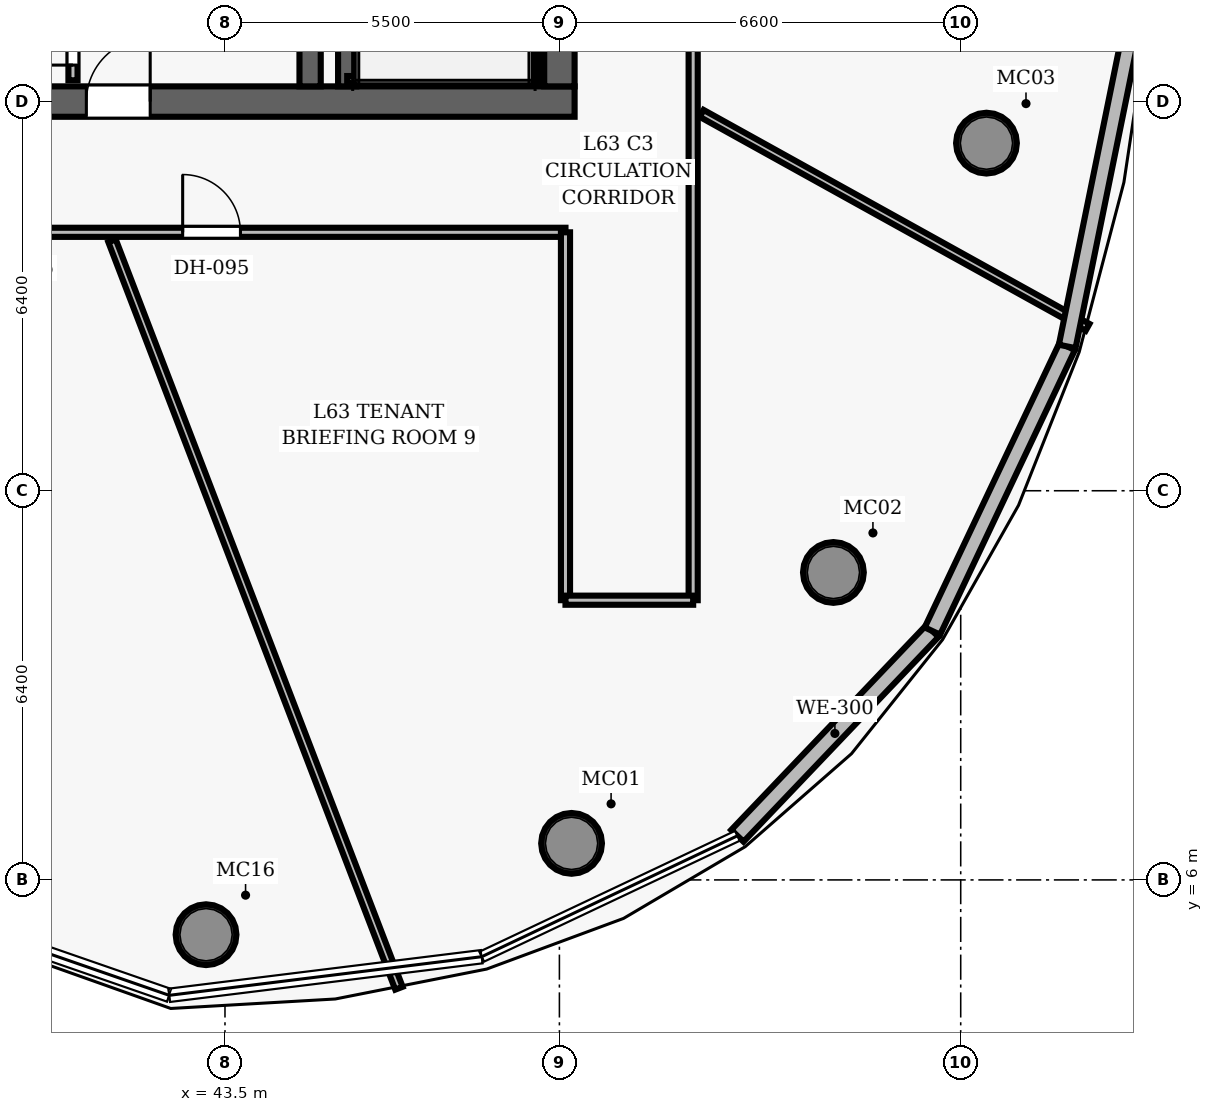
"""IFC4 building model, lengths in metres.
Left out: names, types, materials, properties, quantities, classifications, styles, units other than length and angle.
Written with IfcOpenShell. Run it as: python <this file> out.ifc"""

import sys

from ifc_helpers import new_model, si_unit, direction, frame, frame_2d, origin, origin_2d, place, context, subcontext, project, spatial, rectangle, hollow_circle, extrude, element, fill, save


model = new_model("IFC4")
c1 = context("Model", 3, precision=1e-05, world=origin(), true_north=direction((0.0, 1.0)))
c2 = subcontext(c1, "Body", "Model", "MODEL_VIEW")
j1 = project(units=[si_unit("LENGTHUNIT", "METRE"), si_unit("PLANEANGLEUNIT", "RADIAN")], contexts=[c1])
p1 = place(None, origin())
s1 = spatial("IfcSite", under=j1, at=p1, CompositionType="ELEMENT")
p2 = place(p1, origin())
s2 = spatial("IfcBuilding", under=s1, at=p2, CompositionType="ELEMENT")
p3 = place(p2, frame((0.0, 0.0, 249.75)))
s3 = spatial("IfcBuildingStorey", under=s2, at=p3, CompositionType="ELEMENT", Elevation=249.75)
p4 = place(p3, frame((26.75, 18.8, 0.0), z_axis=(0.0, 0.0, 1.0), x_axis=(1.0, 0.0, 0.0)))
e1 = element("IfcWall", 1, at=p4, inside=s3, PredefinedType="SHEAR", context=c2, shape_type="SweptSolid", body=[
    extrude(rectangle(XDim=22.5, YDim=0.5, at=frame_2d((11.25, 0.0))), origin(), (0.0, 0.0, 1.0), 3.85),
])
p5 = place(p4, frame((14.47, 0.0, 0.0)))
e2 = element("IfcOpeningElement", 2, at=p5, cuts=e1, PredefinedType="OPENING", context=c2, shape_type="SweptSolid", body=[
    extrude(rectangle(XDim=1.05, YDim=2.15, at=frame_2d((0.525, 1.075))), frame((0.0, 0.26, 0.0), z_axis=(0.0, -1.0, 0.0), x_axis=(1.0, 0.0, 0.0)), (0.0, 0.0, 1.0), 0.52),
])
p6 = place(p3, frame((49.0, 19.05, 0.0), z_axis=(0.0, 0.0, 1.0), x_axis=(0.0, 1.0, 0.0)))
e3 = element("IfcWall", 3, at=p6, inside=s3, PredefinedType="SHEAR", context=c2, shape_type="SweptSolid", body=[
    extrude(rectangle(XDim=13.9, YDim=0.5, at=frame_2d((6.95, 0.0))), origin(), (0.0, 0.0, 1.0), 3.85),
])
p7 = place(p6, frame((8.2, 0.0, 0.0)))
e4 = element("IfcOpeningElement", 4, at=p7, cuts=e3, PredefinedType="OPENING", context=c2, shape_type="SweptSolid", body=[
    extrude(rectangle(XDim=1.05, YDim=2.15, at=frame_2d((0.525, 1.075))), frame((0.0, 0.26, 0.0), z_axis=(0.0, -1.0, 0.0), x_axis=(1.0, 0.0, 0.0)), (0.0, 0.0, 1.0), 0.52),
])
p8 = place(p3, frame((44.9, 19.05, 0.0), z_axis=(0.0, 0.0, 1.0), x_axis=(0.0, 1.0, 0.0)))
e5 = element("IfcWall", 5, at=p8, inside=s3, PredefinedType="SHEAR", context=c2, shape_type="SweptSolid", body=[
    extrude(rectangle(XDim=13.9, YDim=0.35, at=frame_2d((6.95, 0.0))), origin(), (0.0, 0.0, 1.0), 3.85),
])
for number, where, z_axis, x_axis in (
    (6, (49.2, 6.601, 0.0), (0.0, 0.0, 1.0), (1.0, 0.0, 0.0)),
    (7, (53.506, 11.056, 0.0), (0.0, 0.0, 1.0), (1.0, 0.0, 0.0)),
    (8, (56.024, 18.116, 0.0), (0.0, 0.0, 1.0), (1.0, 0.0, 0.0)),
    (9, (43.188, 5.099, 0.0), (0.0, 0.0, 1.0), (1.0, 0.0, 0.0)),
):
    element("IfcColumn", number, at=place(p3, frame(where, z_axis=z_axis, x_axis=x_axis)), inside=s3, PredefinedType="COLUMN", context=c2, shape_type="SweptSolid", body=[
        extrude(hollow_circle(Radius=0.5, WallThickness=0.045, at=origin_2d()), origin(), (0.0, 0.0, 1.0), 3.85),
    ])
p9 = place(p3, frame((45.51, 19.05, 0.0), z_axis=(0.0, 0.0, 1.0), x_axis=(0.0, 1.0, 0.0)))
e10 = element("IfcWall", 10, at=p9, inside=s3, PredefinedType="SHEAR", context=c2, shape_type="SweptSolid", body=[
    extrude(rectangle(XDim=7.5, YDim=0.3, at=frame_2d((3.75, 0.0))), origin(), (0.0, 0.0, 1.0), 3.85),
])
p10 = place(p3, frame((48.605, 19.1, 0.0), z_axis=(0.0, 0.0, 1.0), x_axis=(0.0, 1.0, 0.0)))
e11 = element("IfcWall", 11, at=p10, inside=s3, PredefinedType="SHEAR", context=c2, shape_type="SweptSolid", body=[
    extrude(rectangle(XDim=7.45, YDim=0.12, at=frame_2d((3.725, 0.0))), origin(), (0.0, 0.0, 1.0), 3.85),
])
p11 = place(p3, frame((45.51, 19.16, 0.0), z_axis=(0.0, 0.0, 1.0), x_axis=(1.0, 0.0, 0.0)))
e12 = element("IfcWall", 12, at=p11, inside=s3, PredefinedType="SHEAR", context=c2, shape_type="SweptSolid", body=[
    extrude(rectangle(XDim=3.095, YDim=0.12, at=frame_2d((1.547, 0.0))), origin(), (0.0, 0.0, 1.0), 3.85),
])
p12 = place(p3, frame((41.0, 19.15, 0.0), z_axis=(0.0, 0.0, 1.0), x_axis=(0.0, 1.0, 0.0)))
e13 = element("IfcWall", 13, at=p12, inside=s3, PredefinedType="PARTITIONING", context=c2, shape_type="SweptSolid", body=[
    extrude(rectangle(XDim=7.95, YDim=0.15, at=frame_2d((3.975, 0.0))), origin(), (0.0, 0.0, 1.0), 3.04),
])
p13 = place(p12, frame((0.25, 0.0, 0.0)))
e14 = element("IfcOpeningElement", 14, at=p13, cuts=e13, PredefinedType="OPENING", context=c2, shape_type="SweptSolid", body=[
    extrude(rectangle(XDim=0.85, YDim=2.1, at=frame_2d((0.425, 1.05))), frame((0.0, 0.085, 0.0), z_axis=(0.0, -1.0, 0.0), x_axis=(1.0, 0.0, 0.0)), (0.0, 0.0, 1.0), 0.17),
])
p14 = place(p12, frame((2.953, 0.0, 0.0)))
e15 = element("IfcOpeningElement", 15, at=p14, cuts=e13, PredefinedType="OPENING", context=c2, shape_type="SweptSolid", body=[
    extrude(rectangle(XDim=0.85, YDim=2.1, at=frame_2d((0.425, 1.05))), frame((0.0, 0.085, 0.0), z_axis=(0.0, -1.0, 0.0), x_axis=(1.0, 0.0, 0.0)), (0.0, 0.0, 1.0), 0.17),
])
p15 = place(p12, frame((5.576, 0.0, 0.0)))
e16 = element("IfcOpeningElement", 16, at=p15, cuts=e13, PredefinedType="OPENING", context=c2, shape_type="SweptSolid", body=[
    extrude(rectangle(XDim=0.85, YDim=2.1, at=frame_2d((0.425, 1.05))), frame((0.0, 0.085, 0.0), z_axis=(0.0, -1.0, 0.0), x_axis=(1.0, 0.0, 0.0)), (0.0, 0.0, 1.0), 0.17),
])
p16 = place(p3, frame((26.9, 16.65, 0.0), z_axis=(0.0, 0.0, 1.0), x_axis=(1.0, 0.0, 0.0)))
e17 = element("IfcWall", 17, at=p16, inside=s3, PredefinedType="PARTITIONING", context=c2, shape_type="SweptSolid", body=[
    extrude(rectangle(XDim=22.2, YDim=0.15, at=frame_2d((11.1, 0.0))), origin(), (0.0, 0.0, 1.0), 3.04),
])
p17 = place(p16, frame((5.627, 0.0, 0.0)))
e18 = element("IfcOpeningElement", 18, at=p17, cuts=e17, PredefinedType="OPENING", context=c2, shape_type="SweptSolid", body=[
    extrude(rectangle(XDim=0.95, YDim=2.15, at=frame_2d((0.475, 1.075))), frame((0.0, 0.085, 0.0), z_axis=(0.0, -1.0, 0.0), x_axis=(1.0, 0.0, 0.0)), (0.0, 0.0, 1.0), 0.17),
])
p18 = place(p16, frame((12.684, 0.0, 0.0)))
e19 = element("IfcOpeningElement", 19, at=p18, cuts=e17, PredefinedType="OPENING", context=c2, shape_type="SweptSolid", body=[
    extrude(rectangle(XDim=0.95, YDim=2.15, at=frame_2d((0.475, 1.075))), frame((0.0, 0.085, 0.0), z_axis=(0.0, -1.0, 0.0), x_axis=(1.0, 0.0, 0.0)), (0.0, 0.0, 1.0), 0.17),
])
p19 = place(p16, frame((15.904, 0.0, 0.0)))
e20 = element("IfcOpeningElement", 20, at=p19, cuts=e17, PredefinedType="OPENING", context=c2, shape_type="SweptSolid", body=[
    extrude(rectangle(XDim=0.95, YDim=2.15, at=frame_2d((0.475, 1.075))), frame((0.0, 0.085, 0.0), z_axis=(0.0, -1.0, 0.0), x_axis=(1.0, 0.0, 0.0)), (0.0, 0.0, 1.0), 0.17),
])
p20 = place(p3, frame((51.2, 10.6, 0.0), z_axis=(0.0, 0.0, 1.0), x_axis=(0.0, 1.0, 0.0)))
e21 = element("IfcWall", 21, at=p20, inside=s3, PredefinedType="PARTITIONING", context=c2, shape_type="SweptSolid", body=[
    extrude(rectangle(XDim=30.8, YDim=0.15, at=frame_2d((15.4, 0.0))), origin(), (0.0, 0.0, 1.0), 3.04),
])
p21 = place(p20, frame((20.494, 0.0, 0.0)))
e22 = element("IfcOpeningElement", 22, at=p21, cuts=e21, PredefinedType="OPENING", context=c2, shape_type="SweptSolid", body=[
    extrude(rectangle(XDim=0.95, YDim=2.15, at=frame_2d((0.475, 1.075))), frame((0.0, 0.085, 0.0), z_axis=(0.0, -1.0, 0.0), x_axis=(1.0, 0.0, 0.0)), (0.0, 0.0, 1.0), 0.17),
])
p22 = place(p20, frame((10.941, 0.0, 0.0)))
e23 = element("IfcOpeningElement", 23, at=p22, cuts=e21, PredefinedType="OPENING", context=c2, shape_type="SweptSolid", body=[
    extrude(rectangle(XDim=0.95, YDim=2.15, at=frame_2d((0.475, 1.075))), frame((0.0, 0.085, 0.0), z_axis=(0.0, -1.0, 0.0), x_axis=(1.0, 0.0, 0.0)), (0.0, 0.0, 1.0), 0.17),
])
p23 = place(p3, frame((49.1, 10.6, 0.0), z_axis=(0.0, 0.0, 1.0), x_axis=(0.0, 1.0, 0.0)))
e24 = element("IfcWall", 24, at=p23, inside=s3, PredefinedType="PARTITIONING", context=c2, shape_type="SweptSolid", body=[
    extrude(rectangle(XDim=6.05, YDim=0.15, at=frame_2d((3.025, 0.0))), origin(), (0.0, 0.0, 1.0), 3.04),
])
p24 = place(p3, frame((49.1, 10.6, 0.0), z_axis=(0.0, 0.0, 1.0), x_axis=(1.0, 0.0, 0.0)))
e25 = element("IfcWall", 25, at=p24, inside=s3, PredefinedType="PARTITIONING", context=c2, shape_type="SweptSolid", body=[
    extrude(rectangle(XDim=2.1, YDim=0.15, at=frame_2d((1.05, 0.0))), origin(), (0.0, 0.0, 1.0), 3.04),
])
p25 = place(p3, frame((41.643, 16.51, 0.0), z_axis=(0.0, 0.0, 1.0), x_axis=(0.358373851229, -0.933578161032, 0.0)))
e26 = element("IfcWall", 26, at=p25, inside=s3, PredefinedType="PARTITIONING", context=c2, shape_type="SweptSolid", body=[
    extrude(rectangle(XDim=13.166, YDim=0.13, at=frame_2d((6.583, 0.0))), origin(), (0.0, 0.0, 1.0), 3.04),
])
p26 = place(p3, frame((51.34, 18.605, 0.0), z_axis=(0.0, 0.0, 1.0), x_axis=(0.87461556229, -0.484817097678, 0.0)))
e27 = element("IfcWall", 27, at=p26, inside=s3, PredefinedType="PARTITIONING", context=c2, shape_type="SweptSolid", body=[
    extrude(rectangle(XDim=7.256, YDim=0.13, at=frame_2d((3.628, 0.0))), origin(), (0.0, 0.0, 1.0), 3.04),
])
p27 = place(p3, frame((55.135, 10.093, 0.0), z_axis=(0.0, 0.0, 1.0), x_axis=(-0.68967876669, -0.724115459562, 0.0)))
e28 = element("IfcWall", 28, at=p27, inside=s3, PredefinedType="SOLIDWALL", context=c2, shape_type="SweptSolid", body=[
    extrude(rectangle(XDim=4.651, YDim=0.28, at=frame_2d((2.325, 0.0))), origin(), (0.0, 0.0, 1.0), 3.625),
])
p28 = place(p3, frame((57.352, 14.773, 0.0), z_axis=(0.0, 0.0, 1.0), x_axis=(-0.428068107667, -0.903746477281, 0.0)))
e29 = element("IfcWall", 29, at=p28, inside=s3, PredefinedType="SOLIDWALL", context=c2, shape_type="SweptSolid", body=[
    extrude(rectangle(XDim=5.179, YDim=0.28, at=frame_2d((2.59, 0.0))), origin(), (0.0, 0.0, 1.0), 3.625),
])
p29 = place(p3, frame((58.521, 20.516, 0.0), z_axis=(0.0, 0.0, 1.0), x_axis=(-0.199480028062, -0.979901892234, 0.0)))
e30 = element("IfcWall", 30, at=p29, inside=s3, PredefinedType="SOLIDWALL", context=c2, shape_type="SweptSolid", body=[
    extrude(rectangle(XDim=5.86, YDim=0.28, at=frame_2d((2.93, 0.0))), origin(), (0.0, 0.0, 1.0), 3.625),
])
p30 = place(p5, origin())
e31 = element("IfcDoor", 31, at=p30, inside=s3, OperationType="SINGLE_SWING_RIGHT", PredefinedType="DOOR", context=c2, shape_type="SweptSolid", body=[
    extrude(rectangle(XDim=1.05, YDim=2.15, at=frame_2d((0.525, 1.075))), frame((0.0, 0.025, 0.0), z_axis=(0.0, -1.0, 0.0), x_axis=(1.0, 0.0, 0.0)), (0.0, 0.0, 1.0), 0.05),
])
fill(e2, e31)
p31 = place(p13, origin())
e32 = element("IfcDoor", 32, at=p31, inside=s3, OperationType="SINGLE_SWING_LEFT", PredefinedType="DOOR", context=c2, shape_type="SweptSolid", body=[
    extrude(rectangle(XDim=0.85, YDim=2.1, at=frame_2d((0.425, 1.05))), frame((0.0, 0.025, 0.0), z_axis=(0.0, -1.0, 0.0), x_axis=(1.0, 0.0, 0.0)), (0.0, 0.0, 1.0), 0.05),
])
fill(e14, e32)
p32 = place(p19, origin())
e33 = element("IfcDoor", 33, at=p32, inside=s3, OperationType="SINGLE_SWING_LEFT", PredefinedType="DOOR", context=c2, shape_type="SweptSolid", body=[
    extrude(rectangle(XDim=0.95, YDim=2.15, at=frame_2d((0.475, 1.075))), frame((0.0, 0.025, 0.0), z_axis=(0.0, -1.0, 0.0), x_axis=(1.0, 0.0, 0.0)), (0.0, 0.0, 1.0), 0.05),
])
fill(e20, e33)
save(model, sys.argv[1])
